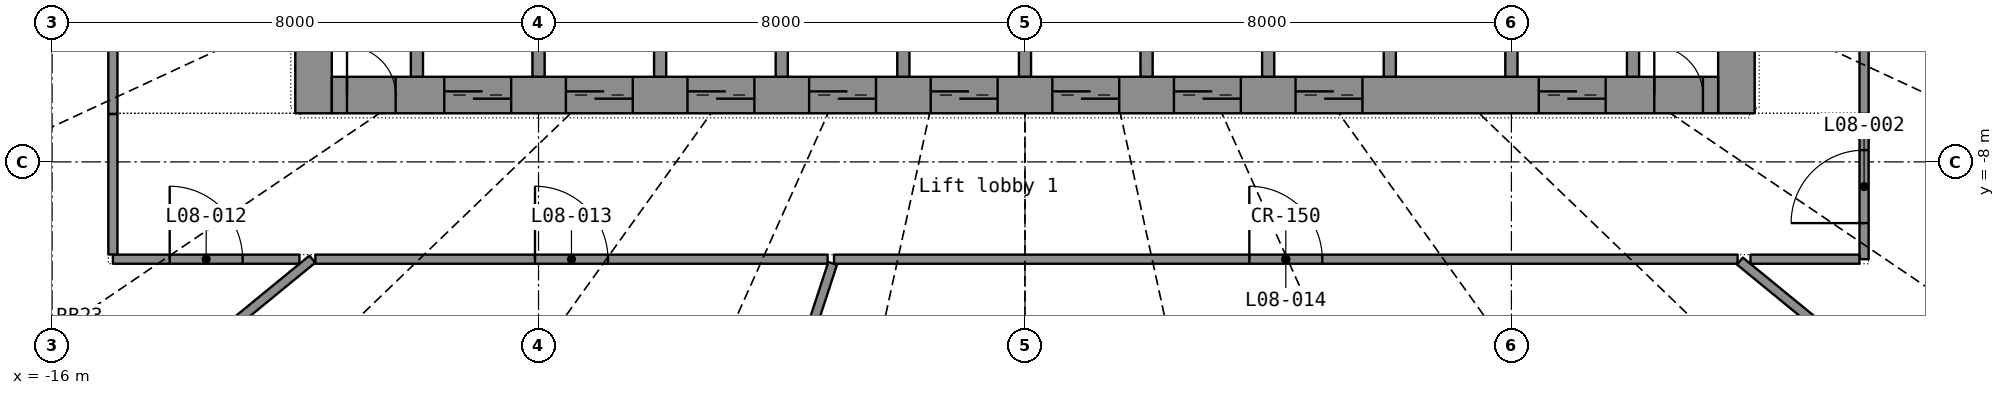
"""IFC4 building model, lengths in metres.
Left out: names, types, materials, properties, quantities, classifications, styles, units other than length and angle.
Written with IfcOpenShell. Run it as: python <this file> out.ifc"""

import sys

from ifc_helpers import new_model, si_unit, direction, frame, frame_2d, origin, place, context, subcontext, project, spatial, rectangle, extrude, element, fill, save


model = new_model("IFC4")
c1 = context("Model", 3, precision=1e-05, world=origin(), true_north=direction((0.0, 1.0)))
c2 = subcontext(c1, "Body", "Model", "MODEL_VIEW")
j1 = project(units=[si_unit("LENGTHUNIT", "METRE"), si_unit("PLANEANGLEUNIT", "RADIAN")], contexts=[c1])
p1 = place(None, origin())
s1 = spatial("IfcSite", under=j1, at=p1, CompositionType="ELEMENT")
p2 = place(p1, origin())
s2 = spatial("IfcBuilding", under=s1, at=p2, CompositionType="ELEMENT")
p3 = place(p2, frame((0.0, 0.0, 40.8)))
s3 = spatial("IfcBuildingStorey", under=s2, at=p3, CompositionType="ELEMENT", Elevation=40.8)
p4 = place(p3, frame((-11.7, -7.2, 0.0), z_axis=(0.0, 0.0, 1.0), x_axis=(0.0, 1.0, 0.0)))
e1 = element("IfcWall", 1, at=p4, inside=s3, PredefinedType="SHEAR", context=c2, shape_type="SweptSolid", body=[
    extrude(rectangle(XDim=14.4, YDim=0.6, at=frame_2d((7.2, 0.0))), origin(), (0.0, 0.0, 1.0), 3.3),
])
p5 = place(p4, frame((6.5, 0.0, 0.0)))
e2 = element("IfcOpeningElement", 2, at=p5, cuts=e1, PredefinedType="OPENING", context=c2, shape_type="SweptSolid", body=[
    extrude(rectangle(XDim=1.4, YDim=2.2, at=frame_2d((0.7, 1.1))), frame((0.0, 0.31, 0.0), z_axis=(0.0, -1.0, 0.0), x_axis=(1.0, 0.0, 0.0)), (0.0, 0.0, 1.0), 0.62),
])
p6 = place(p3, frame((11.7, -7.2, 0.0), z_axis=(0.0, 0.0, 1.0), x_axis=(0.0, 1.0, 0.0)))
e3 = element("IfcWall", 3, at=p6, inside=s3, PredefinedType="SHEAR", context=c2, shape_type="SweptSolid", body=[
    extrude(rectangle(XDim=14.4, YDim=0.6, at=frame_2d((7.2, 0.0))), origin(), (0.0, 0.0, 1.0), 3.3),
])
p7 = place(p6, frame((6.5, 0.0, 0.0)))
e4 = element("IfcOpeningElement", 4, at=p7, cuts=e3, PredefinedType="OPENING", context=c2, shape_type="SweptSolid", body=[
    extrude(rectangle(XDim=1.4, YDim=2.2, at=frame_2d((0.7, 1.1))), frame((0.0, 0.31, 0.0), z_axis=(0.0, -1.0, 0.0), x_axis=(1.0, 0.0, 0.0)), (0.0, 0.0, 1.0), 0.62),
])
p8 = place(p3, frame((-11.4, -6.9, 0.0), z_axis=(0.0, 0.0, 1.0), x_axis=(1.0, 0.0, 0.0)))
e5 = element("IfcWall", 5, at=p8, inside=s3, PredefinedType="SHEAR", context=c2, shape_type="SweptSolid", body=[
    extrude(rectangle(XDim=22.8, YDim=0.6, at=frame_2d((11.4, 0.0))), origin(), (0.0, 0.0, 1.0), 3.3),
])
p9 = place(p8, frame((1.85, 0.0, 0.0)))
e6 = element("IfcOpeningElement", 6, at=p9, cuts=e5, PredefinedType="OPENING", context=c2, shape_type="SweptSolid", body=[
    extrude(rectangle(XDim=1.1, YDim=2.2, at=frame_2d((0.55, 1.1))), frame((0.0, 0.31, 0.0), z_axis=(0.0, -1.0, 0.0), x_axis=(1.0, 0.0, 0.0)), (0.0, 0.0, 1.0), 0.62),
])
p10 = place(p8, frame((3.85, 0.0, 0.0)))
e7 = element("IfcOpeningElement", 7, at=p10, cuts=e5, PredefinedType="OPENING", context=c2, shape_type="SweptSolid", body=[
    extrude(rectangle(XDim=1.1, YDim=2.2, at=frame_2d((0.55, 1.1))), frame((0.0, 0.31, 0.0), z_axis=(0.0, -1.0, 0.0), x_axis=(1.0, 0.0, 0.0)), (0.0, 0.0, 1.0), 0.62),
])
p11 = place(p8, frame((5.85, 0.0, 0.0)))
e8 = element("IfcOpeningElement", 8, at=p11, cuts=e5, PredefinedType="OPENING", context=c2, shape_type="SweptSolid", body=[
    extrude(rectangle(XDim=1.1, YDim=2.2, at=frame_2d((0.55, 1.1))), frame((0.0, 0.31, 0.0), z_axis=(0.0, -1.0, 0.0), x_axis=(1.0, 0.0, 0.0)), (0.0, 0.0, 1.0), 0.62),
])
p12 = place(p8, frame((7.85, 0.0, 0.0)))
e9 = element("IfcOpeningElement", 9, at=p12, cuts=e5, PredefinedType="OPENING", context=c2, shape_type="SweptSolid", body=[
    extrude(rectangle(XDim=1.1, YDim=2.2, at=frame_2d((0.55, 1.1))), frame((0.0, 0.31, 0.0), z_axis=(0.0, -1.0, 0.0), x_axis=(1.0, 0.0, 0.0)), (0.0, 0.0, 1.0), 0.62),
])
p13 = place(p8, frame((9.85, 0.0, 0.0)))
e10 = element("IfcOpeningElement", 10, at=p13, cuts=e5, PredefinedType="OPENING", context=c2, shape_type="SweptSolid", body=[
    extrude(rectangle(XDim=1.1, YDim=2.2, at=frame_2d((0.55, 1.1))), frame((0.0, 0.31, 0.0), z_axis=(0.0, -1.0, 0.0), x_axis=(1.0, 0.0, 0.0)), (0.0, 0.0, 1.0), 0.62),
])
p14 = place(p8, frame((11.85, 0.0, 0.0)))
e11 = element("IfcOpeningElement", 11, at=p14, cuts=e5, PredefinedType="OPENING", context=c2, shape_type="SweptSolid", body=[
    extrude(rectangle(XDim=1.1, YDim=2.2, at=frame_2d((0.55, 1.1))), frame((0.0, 0.31, 0.0), z_axis=(0.0, -1.0, 0.0), x_axis=(1.0, 0.0, 0.0)), (0.0, 0.0, 1.0), 0.62),
])
p15 = place(p8, frame((13.85, 0.0, 0.0)))
e12 = element("IfcOpeningElement", 12, at=p15, cuts=e5, PredefinedType="OPENING", context=c2, shape_type="SweptSolid", body=[
    extrude(rectangle(XDim=1.1, YDim=2.2, at=frame_2d((0.55, 1.1))), frame((0.0, 0.31, 0.0), z_axis=(0.0, -1.0, 0.0), x_axis=(1.0, 0.0, 0.0)), (0.0, 0.0, 1.0), 0.62),
])
p16 = place(p8, frame((15.85, 0.0, 0.0)))
e13 = element("IfcOpeningElement", 13, at=p16, cuts=e5, PredefinedType="OPENING", context=c2, shape_type="SweptSolid", body=[
    extrude(rectangle(XDim=1.1, YDim=2.2, at=frame_2d((0.55, 1.1))), frame((0.0, 0.31, 0.0), z_axis=(0.0, -1.0, 0.0), x_axis=(1.0, 0.0, 0.0)), (0.0, 0.0, 1.0), 0.62),
])
p17 = place(p8, frame((19.85, 0.0, 0.0)))
e14 = element("IfcOpeningElement", 14, at=p17, cuts=e5, PredefinedType="OPENING", context=c2, shape_type="SweptSolid", body=[
    extrude(rectangle(XDim=1.1, YDim=2.2, at=frame_2d((0.55, 1.1))), frame((0.0, 0.31, 0.0), z_axis=(0.0, -1.0, 0.0), x_axis=(1.0, 0.0, 0.0)), (0.0, 0.0, 1.0), 0.62),
])
p18 = place(p8, frame((0.25, 0.0, 0.0)))
e15 = element("IfcOpeningElement", 15, at=p18, cuts=e5, PredefinedType="OPENING", context=c2, shape_type="SweptSolid", body=[
    extrude(rectangle(XDim=0.8, YDim=2.05, at=frame_2d((0.4, 1.025))), frame((0.0, 0.31, 0.0), z_axis=(0.0, -1.0, 0.0), x_axis=(1.0, 0.0, 0.0)), (0.0, 0.0, 1.0), 0.62),
])
p19 = place(p8, frame((21.75, 0.0, 0.0)))
e16 = element("IfcOpeningElement", 16, at=p19, cuts=e5, PredefinedType="OPENING", context=c2, shape_type="SweptSolid", body=[
    extrude(rectangle(XDim=0.8, YDim=2.05, at=frame_2d((0.4, 1.025))), frame((0.0, 0.31, 0.0), z_axis=(0.0, -1.0, 0.0), x_axis=(1.0, 0.0, 0.0)), (0.0, 0.0, 1.0), 0.62),
])
for number, where, z_axis, x_axis in (
    (17, (-10.0, -6.6, 0.0), (0.0, 0.0, 1.0), (0.0, 1.0, 0.0)),
    (18, (-8.0, -6.6, 0.0), (0.0, 0.0, 1.0), (0.0, 1.0, 0.0)),
    (19, (-6.0, -6.6, 0.0), (0.0, 0.0, 1.0), (0.0, 1.0, 0.0)),
    (20, (-4.0, -6.6, 0.0), (0.0, 0.0, 1.0), (0.0, 1.0, 0.0)),
    (21, (-2.0, -6.6, 0.0), (0.0, 0.0, 1.0), (0.0, 1.0, 0.0)),
    (22, (0.0, -6.6, 0.0), (0.0, 0.0, 1.0), (0.0, 1.0, 0.0)),
    (23, (2.0, -6.6, 0.0), (0.0, 0.0, 1.0), (0.0, 1.0, 0.0)),
    (24, (4.0, -6.6, 0.0), (0.0, 0.0, 1.0), (0.0, 1.0, 0.0)),
    (25, (6.0, -6.6, 0.0), (0.0, 0.0, 1.0), (0.0, 1.0, 0.0)),
    (26, (8.0, -6.6, 0.0), (0.0, 0.0, 1.0), (0.0, 1.0, 0.0)),
    (27, (10.0, -6.6, 0.0), (0.0, 0.0, 1.0), (0.0, 1.0, 0.0)),
):
    element("IfcWall", number, at=place(p3, frame(where, z_axis=z_axis, x_axis=x_axis)), inside=s3, PredefinedType="SHEAR", context=c2, shape_type="SweptSolid", body=[
        extrude(rectangle(XDim=2.7, YDim=0.2, at=frame_2d((1.35, 0.0))), origin(), (0.0, 0.0, 1.0), 3.3),
    ])
p20 = place(p3, frame((-3.14, -9.6, 0.0), z_axis=(0.0, 0.0, 1.0), x_axis=(1.0, 0.0, 0.0)))
e28 = element("IfcWall", 28, at=p20, inside=s3, PredefinedType="PARTITIONING", context=c2, shape_type="SweptSolid", body=[
    extrude(rectangle(XDim=14.86, YDim=0.15, at=frame_2d((7.43, 0.0))), origin(), (0.0, 0.0, 1.0), 2.4),
])
p21 = place(p20, frame((6.83, 0.0, 0.0)))
e29 = element("IfcOpeningElement", 29, at=p21, cuts=e28, PredefinedType="OPENING", context=c2, shape_type="SweptSolid", body=[
    extrude(rectangle(XDim=1.2, YDim=2.2, at=frame_2d((0.6, 1.1))), frame((0.0, 0.085, 0.0), z_axis=(0.0, -1.0, 0.0), x_axis=(1.0, 0.0, 0.0)), (0.0, 0.0, 1.0), 0.17),
])
p22 = place(p3, frame((-7.226, -22.091, 0.0), z_axis=(0.0, 0.0, 1.0), x_axis=(0.310909896, 0.950439391, 0.0)))
e30 = element("IfcWall", 30, at=p22, inside=s3, PredefinedType="PARTITIONING", context=c2, shape_type="SweptSolid", body=[
    extrude(rectangle(XDim=13.069, YDim=0.15, at=frame_2d((6.534, 0.0))), origin(), (0.0, 0.0, 1.0), 2.4),
])
p23 = place(p3, frame((-19.75, -16.178, 0.0), z_axis=(0.0, 0.0, 1.0), x_axis=(0.773607181, 0.633665471, 0.0)))
e31 = element("IfcWall", 31, at=p23, inside=s3, PredefinedType="PARTITIONING", context=c2, shape_type="SweptSolid", body=[
    extrude(rectangle(XDim=10.38, YDim=0.15, at=frame_2d((5.19, 0.0))), origin(), (0.0, 0.0, 1.0), 2.4),
])
p24 = place(p3, frame((11.758, -9.631, 0.0), z_axis=(0.0, 0.0, 1.0), x_axis=(0.773600236, -0.63367395, 0.0)))
e32 = element("IfcWall", 32, at=p24, inside=s3, PredefinedType="PARTITIONING", context=c2, shape_type="SweptSolid", body=[
    extrude(rectangle(XDim=10.331, YDim=0.15, at=frame_2d((5.166, 0.0))), origin(), (0.0, 0.0, 1.0), 2.4),
])
p25 = place(p3, frame((-11.67, -9.6, 0.0), z_axis=(0.0, 0.0, 1.0), x_axis=(1.0, 0.0, 0.0)))
e33 = element("IfcWall", 33, at=p25, inside=s3, PredefinedType="PARTITIONING", context=c2, shape_type="SweptSolid", body=[
    extrude(rectangle(XDim=8.425, YDim=0.15, at=frame_2d((4.212, 0.0))), origin(), (0.0, 0.0, 1.0), 2.4),
])
p26 = place(p25, frame((3.612, 0.0, 0.0)))
e34 = element("IfcOpeningElement", 34, at=p26, cuts=e33, PredefinedType="OPENING", context=c2, shape_type="SweptSolid", body=[
    extrude(rectangle(XDim=1.2, YDim=2.2, at=frame_2d((0.6, 1.1))), frame((0.0, 0.085, 0.0), z_axis=(0.0, -1.0, 0.0), x_axis=(1.0, 0.0, 0.0)), (0.0, 0.0, 1.0), 0.17),
])
p27 = place(p3, frame((13.8, -7.212, 0.0), z_axis=(0.0, 0.0, 1.0), x_axis=(0.0, 1.0, 0.0)))
e35 = element("IfcWall", 35, at=p27, inside=s3, PredefinedType="PARTITIONING", context=c2, shape_type="SweptSolid", body=[
    extrude(rectangle(XDim=8.124, YDim=0.15, at=frame_2d((4.062, 0.0))), origin(), (0.0, 0.0, 1.0), 2.4),
])
p28 = place(p27, frame((3.462, 0.0, 0.0)))
e36 = element("IfcOpeningElement", 36, at=p28, cuts=e35, PredefinedType="OPENING", context=c2, shape_type="SweptSolid", body=[
    extrude(rectangle(XDim=1.2, YDim=2.2, at=frame_2d((0.6, 1.1))), frame((0.0, 0.085, 0.0), z_axis=(0.0, -1.0, 0.0), x_axis=(1.0, 0.0, 0.0)), (0.0, 0.0, 1.0), 0.17),
])
p29 = place(p3, frame((-15.0, -3.387, 0.0), z_axis=(0.0, 0.0, 1.0), x_axis=(0.0, -1.0, 0.0)))
e37 = element("IfcWall", 37, at=p29, inside=s3, PredefinedType="PARTITIONING", context=c2, shape_type="SweptSolid", body=[
    extrude(rectangle(XDim=3.824, YDim=0.15, at=frame_2d((1.912, 0.0))), origin(), (0.0, 0.0, 1.0), 2.4),
])
p30 = place(p29, frame((1.312, 0.0, 0.0)))
e38 = element("IfcOpeningElement", 38, at=p30, cuts=e37, PredefinedType="OPENING", context=c2, shape_type="SweptSolid", body=[
    extrude(rectangle(XDim=1.2, YDim=2.2, at=frame_2d((0.6, 1.1))), frame((0.0, 0.085, 0.0), z_axis=(0.0, -1.0, 0.0), x_axis=(1.0, 0.0, 0.0)), (0.0, 0.0, 1.0), 0.17),
])
p31 = place(p3, frame((-15.0, -9.6, 0.0), z_axis=(0.0, 0.0, 1.0), x_axis=(1.0, 0.0, 0.0)))
e39 = element("IfcWall", 39, at=p31, inside=s3, PredefinedType="PARTITIONING", context=c2, shape_type="SweptSolid", body=[
    extrude(rectangle(XDim=3.068, YDim=0.15, at=frame_2d((1.534, 0.0))), origin(), (0.0, 0.0, 1.0), 2.4),
])
p32 = place(p31, frame((0.934, 0.0, 0.0)))
e40 = element("IfcOpeningElement", 40, at=p32, cuts=e39, PredefinedType="OPENING", context=c2, shape_type="SweptSolid", body=[
    extrude(rectangle(XDim=1.2, YDim=2.2, at=frame_2d((0.6, 1.1))), frame((0.0, 0.085, 0.0), z_axis=(0.0, -1.0, 0.0), x_axis=(1.0, 0.0, 0.0)), (0.0, 0.0, 1.0), 0.17),
])
p33 = place(p3, frame((-15.0, -7.213, 0.0), z_axis=(0.0, 0.0, 1.0), x_axis=(0.0, -1.0, 0.0)))
e41 = element("IfcWall", 41, at=p33, inside=s3, PredefinedType="PARTITIONING", context=c2, shape_type="SweptSolid", body=[
    extrude(rectangle(XDim=2.31, YDim=0.15, at=frame_2d((1.155, 0.0))), origin(), (0.0, 0.0, 1.0), 2.4),
])
p34 = place(p3, frame((13.8, -9.6, 0.0), z_axis=(0.0, 0.0, 1.0), x_axis=(0.0, 1.0, 0.0)))
e42 = element("IfcWall", 42, at=p34, inside=s3, PredefinedType="PARTITIONING", context=c2, shape_type="SweptSolid", body=[
    extrude(rectangle(XDim=2.387, YDim=0.15, at=frame_2d((1.194, 0.0))), origin(), (0.0, 0.0, 1.0), 2.4),
])
p35 = place(p34, frame((0.594, 0.0, 0.0)))
e43 = element("IfcOpeningElement", 43, at=p35, cuts=e42, PredefinedType="OPENING", context=c2, shape_type="SweptSolid", body=[
    extrude(rectangle(XDim=1.2, YDim=2.2, at=frame_2d((0.6, 1.1))), frame((0.0, 0.085, 0.0), z_axis=(0.0, -1.0, 0.0), x_axis=(1.0, 0.0, 0.0)), (0.0, 0.0, 1.0), 0.17),
])
p36 = place(p3, frame((11.932, -9.6, 0.0), z_axis=(0.0, 0.0, 1.0), x_axis=(1.0, 0.0, 0.0)))
e44 = element("IfcWall", 44, at=p36, inside=s3, PredefinedType="PARTITIONING", context=c2, shape_type="SweptSolid", body=[
    extrude(rectangle(XDim=1.791, YDim=0.15, at=frame_2d((0.896, 0.0))), origin(), (0.0, 0.0, 1.0), 2.4),
])
p37 = place(p9, origin())
e45 = element("IfcDoor", 45, at=p37, inside=s3, OperationType="DOUBLE_DOOR_SLIDING", PredefinedType="DOOR", context=c2, shape_type="SweptSolid", body=[
    extrude(rectangle(XDim=1.1, YDim=2.2, at=frame_2d((0.55, 1.1))), frame((0.0, 0.025, 0.0), z_axis=(0.0, -1.0, 0.0), x_axis=(1.0, 0.0, 0.0)), (0.0, 0.0, 1.0), 0.05),
])
fill(e6, e45)
p38 = place(p10, origin())
e46 = element("IfcDoor", 46, at=p38, inside=s3, OperationType="DOUBLE_DOOR_SLIDING", PredefinedType="DOOR", context=c2, shape_type="SweptSolid", body=[
    extrude(rectangle(XDim=1.1, YDim=2.2, at=frame_2d((0.55, 1.1))), frame((0.0, 0.025, 0.0), z_axis=(0.0, -1.0, 0.0), x_axis=(1.0, 0.0, 0.0)), (0.0, 0.0, 1.0), 0.05),
])
fill(e7, e46)
p39 = place(p11, origin())
e47 = element("IfcDoor", 47, at=p39, inside=s3, OperationType="DOUBLE_DOOR_SLIDING", PredefinedType="DOOR", context=c2, shape_type="SweptSolid", body=[
    extrude(rectangle(XDim=1.1, YDim=2.2, at=frame_2d((0.55, 1.1))), frame((0.0, 0.025, 0.0), z_axis=(0.0, -1.0, 0.0), x_axis=(1.0, 0.0, 0.0)), (0.0, 0.0, 1.0), 0.05),
])
fill(e8, e47)
p40 = place(p12, origin())
e48 = element("IfcDoor", 48, at=p40, inside=s3, OperationType="DOUBLE_DOOR_SLIDING", PredefinedType="DOOR", context=c2, shape_type="SweptSolid", body=[
    extrude(rectangle(XDim=1.1, YDim=2.2, at=frame_2d((0.55, 1.1))), frame((0.0, 0.025, 0.0), z_axis=(0.0, -1.0, 0.0), x_axis=(1.0, 0.0, 0.0)), (0.0, 0.0, 1.0), 0.05),
])
fill(e9, e48)
p41 = place(p13, origin())
e49 = element("IfcDoor", 49, at=p41, inside=s3, OperationType="DOUBLE_DOOR_SLIDING", PredefinedType="DOOR", context=c2, shape_type="SweptSolid", body=[
    extrude(rectangle(XDim=1.1, YDim=2.2, at=frame_2d((0.55, 1.1))), frame((0.0, 0.025, 0.0), z_axis=(0.0, -1.0, 0.0), x_axis=(1.0, 0.0, 0.0)), (0.0, 0.0, 1.0), 0.05),
])
fill(e10, e49)
p42 = place(p14, origin())
e50 = element("IfcDoor", 50, at=p42, inside=s3, OperationType="DOUBLE_DOOR_SLIDING", PredefinedType="DOOR", context=c2, shape_type="SweptSolid", body=[
    extrude(rectangle(XDim=1.1, YDim=2.2, at=frame_2d((0.55, 1.1))), frame((0.0, 0.025, 0.0), z_axis=(0.0, -1.0, 0.0), x_axis=(1.0, 0.0, 0.0)), (0.0, 0.0, 1.0), 0.05),
])
fill(e11, e50)
p43 = place(p15, origin())
e51 = element("IfcDoor", 51, at=p43, inside=s3, OperationType="DOUBLE_DOOR_SLIDING", PredefinedType="DOOR", context=c2, shape_type="SweptSolid", body=[
    extrude(rectangle(XDim=1.1, YDim=2.2, at=frame_2d((0.55, 1.1))), frame((0.0, 0.025, 0.0), z_axis=(0.0, -1.0, 0.0), x_axis=(1.0, 0.0, 0.0)), (0.0, 0.0, 1.0), 0.05),
])
fill(e12, e51)
p44 = place(p16, origin())
e52 = element("IfcDoor", 52, at=p44, inside=s3, OperationType="DOUBLE_DOOR_SLIDING", PredefinedType="DOOR", context=c2, shape_type="SweptSolid", body=[
    extrude(rectangle(XDim=1.1, YDim=2.2, at=frame_2d((0.55, 1.1))), frame((0.0, 0.025, 0.0), z_axis=(0.0, -1.0, 0.0), x_axis=(1.0, 0.0, 0.0)), (0.0, 0.0, 1.0), 0.05),
])
fill(e13, e52)
p45 = place(p17, origin())
e53 = element("IfcDoor", 53, at=p45, inside=s3, OperationType="DOUBLE_DOOR_SLIDING", PredefinedType="DOOR", context=c2, shape_type="SweptSolid", body=[
    extrude(rectangle(XDim=1.1, YDim=2.2, at=frame_2d((0.55, 1.1))), frame((0.0, 0.025, 0.0), z_axis=(0.0, -1.0, 0.0), x_axis=(1.0, 0.0, 0.0)), (0.0, 0.0, 1.0), 0.05),
])
fill(e14, e53)
p46 = place(p18, origin())
e54 = element("IfcDoor", 54, at=p46, inside=s3, OperationType="SINGLE_SWING_LEFT", PredefinedType="DOOR", context=c2, shape_type="SweptSolid", body=[
    extrude(rectangle(XDim=0.8, YDim=2.05, at=frame_2d((0.4, 1.025))), frame((0.0, 0.025, 0.0), z_axis=(0.0, -1.0, 0.0), x_axis=(1.0, 0.0, 0.0)), (0.0, 0.0, 1.0), 0.05),
])
fill(e15, e54)
p47 = place(p19, origin())
e55 = element("IfcDoor", 55, at=p47, inside=s3, OperationType="SINGLE_SWING_LEFT", PredefinedType="DOOR", context=c2, shape_type="SweptSolid", body=[
    extrude(rectangle(XDim=0.8, YDim=2.05, at=frame_2d((0.4, 1.025))), frame((0.0, 0.025, 0.0), z_axis=(0.0, -1.0, 0.0), x_axis=(1.0, 0.0, 0.0)), (0.0, 0.0, 1.0), 0.05),
])
fill(e16, e55)
p48 = place(p35, origin())
e56 = element("IfcDoor", 56, at=p48, inside=s3, OperationType="DOUBLE_DOOR_SINGLE_SWING", PredefinedType="DOOR", context=c2, shape_type="SweptSolid", body=[
    extrude(rectangle(XDim=1.2, YDim=2.2, at=frame_2d((0.6, 1.1))), frame((0.0, 0.025, 0.0), z_axis=(0.0, -1.0, 0.0), x_axis=(1.0, 0.0, 0.0)), (0.0, 0.0, 1.0), 0.05),
])
fill(e43, e56)
p49 = place(p32, origin())
e57 = element("IfcDoor", 57, at=p49, inside=s3, OperationType="DOUBLE_DOOR_SINGLE_SWING", PredefinedType="DOOR", context=c2, shape_type="SweptSolid", body=[
    extrude(rectangle(XDim=1.2, YDim=2.2, at=frame_2d((0.6, 1.1))), frame((0.0, 0.025, 0.0), z_axis=(0.0, -1.0, 0.0), x_axis=(1.0, 0.0, 0.0)), (0.0, 0.0, 1.0), 0.05),
])
fill(e40, e57)
p50 = place(p26, origin())
e58 = element("IfcDoor", 58, at=p50, inside=s3, OperationType="DOUBLE_DOOR_SINGLE_SWING", PredefinedType="DOOR", context=c2, shape_type="SweptSolid", body=[
    extrude(rectangle(XDim=1.2, YDim=2.2, at=frame_2d((0.6, 1.1))), frame((0.0, 0.025, 0.0), z_axis=(0.0, -1.0, 0.0), x_axis=(1.0, 0.0, 0.0)), (0.0, 0.0, 1.0), 0.05),
])
fill(e34, e58)
p51 = place(p21, origin())
e59 = element("IfcDoor", 59, at=p51, inside=s3, OperationType="DOUBLE_DOOR_SINGLE_SWING", PredefinedType="DOOR", context=c2, shape_type="SweptSolid", body=[
    extrude(rectangle(XDim=1.2, YDim=2.2, at=frame_2d((0.6, 1.1))), frame((0.0, 0.025, 0.0), z_axis=(0.0, -1.0, 0.0), x_axis=(1.0, 0.0, 0.0)), (0.0, 0.0, 1.0), 0.05),
])
fill(e29, e59)
save(model, sys.argv[1])
